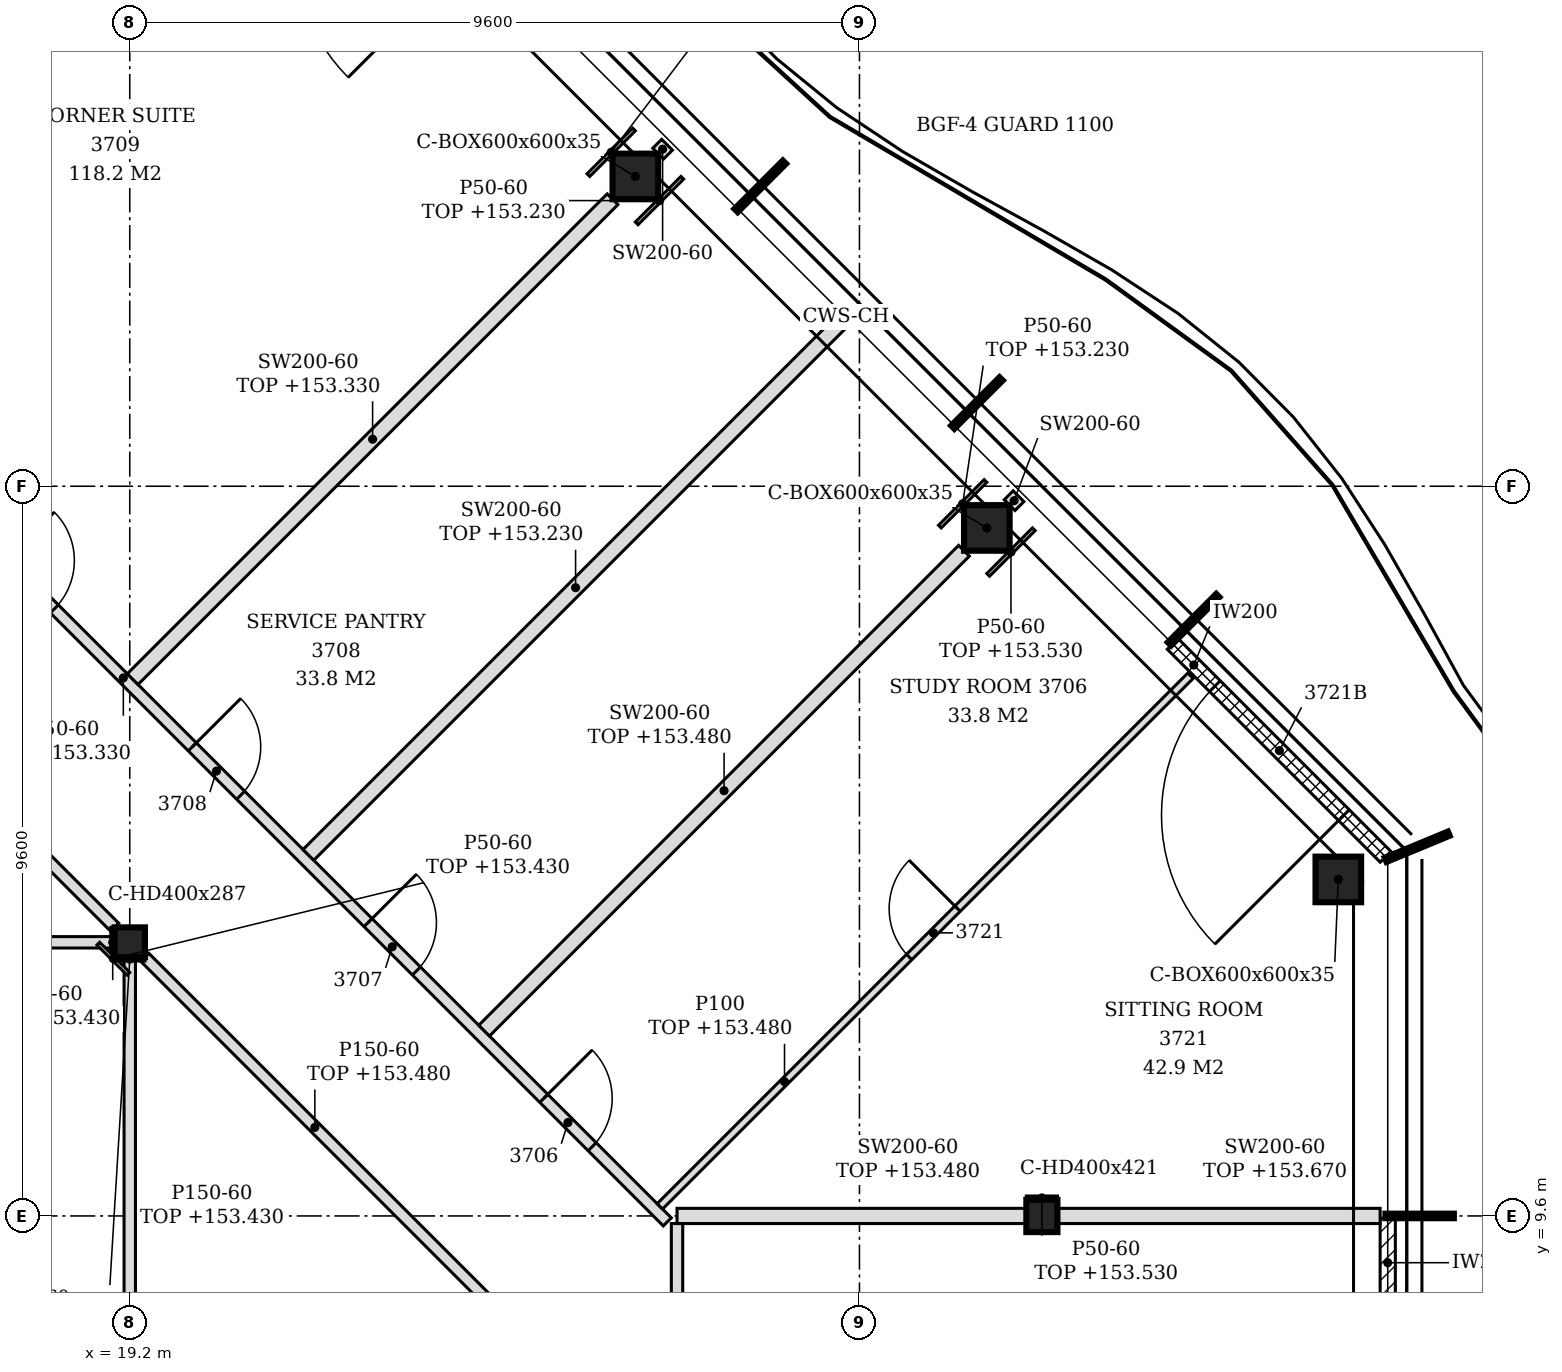
"""IFC4 building model, lengths in metres.
Left out: names, types, materials, properties, quantities, classifications, styles, units other than length and angle.
Written with IfcOpenShell. Run it as: python <this file> out.ifc"""

import sys

from ifc_helpers import new_model, si_unit, direction, frame, frame_2d, origin, origin_2d, place, context, subcontext, project, spatial, polyline, rectangle, hollow_rectangle, i_section, outline, extrude, element, fill, save


model = new_model("IFC4")
c1 = context("Model", 3, precision=1e-05, world=origin(), true_north=direction((0.0, 1.0)))
c2 = subcontext(c1, "Body", "Model", "MODEL_VIEW")
j1 = project(units=[si_unit("LENGTHUNIT", "METRE"), si_unit("PLANEANGLEUNIT", "RADIAN")], contexts=[c1])
p1 = place(None, origin())
s1 = spatial("IfcSite", under=j1, at=p1, CompositionType="ELEMENT")
p2 = place(p1, origin())
s2 = spatial("IfcBuilding", under=s1, at=p2, CompositionType="ELEMENT")
p3 = place(p2, frame((0.0, 0.0, 150.6)))
s3 = spatial("IfcBuildingStorey", under=s2, at=p3, CompositionType="ELEMENT", Elevation=150.6)
for number, where, z_axis, x_axis in (
    (1, (35.1, 14.027, -0.15), (0.0, 0.0, 1.0), (1.0, 0.0, 0.0)),
    (2, (30.476, 18.652, -0.15), (0.0, 0.0, 1.0), (1.0, 0.0, 0.0)),
    (3, (25.852, 23.276, -0.15), (0.0, 0.0, 1.0), (1.0, 0.0, 0.0)),
):
    element("IfcColumn", number, at=place(p3, frame(where, z_axis=z_axis, x_axis=x_axis)), inside=s3, PredefinedType="COLUMN", context=c2, shape_type="SweptSolid", body=[
        extrude(hollow_rectangle(XDim=0.6, YDim=0.6, WallThickness=0.035, at=origin_2d()), origin(), (0.0, 0.0, 1.0), 3.6),
    ])
p4 = place(p3, frame((19.2, 13.2, -0.15), z_axis=(0.0, 0.0, 1.0), x_axis=(1.0, 0.0, 0.0)))
e4 = element("IfcColumn", 4, at=p4, inside=s3, PredefinedType="COLUMN", context=c2, shape_type="SweptSolid", body=[
    extrude(i_section(OverallWidth=0.399, OverallDepth=0.393, WebThickness=0.023, FlangeThickness=0.037, FilletRadius=0.015, at=origin_2d()), origin(), (0.0, 0.0, 1.0), 3.6),
])
p5 = place(p3, frame((31.2, 9.6, -0.15), z_axis=(0.0, 0.0, 1.0), x_axis=(1.0, 0.0, 0.0)))
e5 = element("IfcColumn", 5, at=p5, inside=s3, PredefinedType="COLUMN", context=c2, shape_type="SweptSolid", body=[
    extrude(i_section(OverallWidth=0.409, OverallDepth=0.425, WebThickness=0.033, FlangeThickness=0.052, FilletRadius=0.015, at=origin_2d()), origin(), (0.0, 0.0, 1.0), 3.6),
])
p6 = place(p3, frame((35.75, 4.83, 0.0), z_axis=(0.0, 0.0, 1.0), x_axis=(0.0, 1.0, 0.0)))
e6 = element("IfcWall", 6, at=p6, inside=s3, PredefinedType="NOTDEFINED", context=c2, shape_type="SweptSolid", body=[
    extrude(rectangle(XDim=4.74, YDim=0.2, at=frame_2d((2.37, 0.0))), origin(), (0.0, 0.0, 1.0), 3.45),
])
p7 = place(p6, frame((1.17, 0.0, 0.0)))
e7 = element("IfcOpeningElement", 7, at=p7, cuts=e6, PredefinedType="OPENING", context=c2, shape_type="SweptSolid", body=[
    extrude(rectangle(XDim=2.4, YDim=2.4, at=frame_2d((1.2, 1.2))), frame((0.0, 0.11, 0.0), z_axis=(0.0, -1.0, 0.0), x_axis=(1.0, 0.0, 0.0)), (0.0, 0.0, 1.0), 0.22),
])
p8 = place(p3, frame((35.722, 14.325, 0.0), z_axis=(0.0, 0.0, 1.0), x_axis=(-0.707106781187, 0.707106781187, 0.0)))
e8 = element("IfcWall", 8, at=p8, inside=s3, PredefinedType="NOTDEFINED", context=c2, shape_type="SweptSolid", body=[
    extrude(rectangle(XDim=3.962, YDim=0.2, at=frame_2d((1.981, 0.0))), origin(), (0.0, 0.0, 1.0), 3.45),
])
p9 = place(p8, frame((0.775, 0.0, 0.0)))
e9 = element("IfcOpeningElement", 9, at=p9, cuts=e8, PredefinedType="OPENING", context=c2, shape_type="SweptSolid", body=[
    extrude(rectangle(XDim=2.4, YDim=2.4, at=frame_2d((1.2, 1.2))), frame((0.0, 0.11, 0.0), z_axis=(0.0, -1.0, 0.0), x_axis=(1.0, 0.0, 0.0)), (0.0, 0.0, 1.0), 0.22),
])
p10 = place(p3, frame((26.4, -4.448, 0.0), z_axis=(0.0, 0.0, 1.0), x_axis=(0.0, 1.0, 0.0)))
e10 = element("IfcWall", 10, at=p10, inside=s3, PredefinedType="PARTITIONING", context=c2, shape_type="SweptSolid", body=[
    extrude(outline(polyline([(0.0, 0.0), (13.948, 0.0), (13.948, 2.88), (13.943, 2.88), (13.941, 3.45), (9.353, 3.45), (9.351, 2.88), (9.143, 2.88), (9.141, 3.45), (4.553, 3.45), (4.551, 2.88), (4.343, 2.88), (4.341, 3.45), (0.0, 3.45), (0.0, 0.0)])), frame((0.0, 0.075, 0.0), z_axis=(0.0, -1.0, 0.0), x_axis=(1.0, 0.0, 0.0)), (0.0, 0.0, 1.0), 0.15),
])
p11 = place(p10, frame((1.701, 0.0, 0.0)))
e11 = element("IfcOpeningElement", 11, at=p11, cuts=e10, PredefinedType="OPENING", context=c2, shape_type="SweptSolid", body=[
    extrude(rectangle(XDim=0.9, YDim=2.1, at=frame_2d((0.45, 1.05))), frame((0.0, 0.085, 0.0), z_axis=(0.0, -1.0, 0.0), x_axis=(1.0, 0.0, 0.0)), (0.0, 0.0, 1.0), 0.17),
])
p12 = place(p10, frame((5.198, 0.0, 0.0)))
e12 = element("IfcOpeningElement", 12, at=p12, cuts=e10, PredefinedType="OPENING", context=c2, shape_type="SweptSolid", body=[
    extrude(rectangle(XDim=0.9, YDim=2.1, at=frame_2d((0.45, 1.05))), frame((0.0, 0.085, 0.0), z_axis=(0.0, -1.0, 0.0), x_axis=(1.0, 0.0, 0.0)), (0.0, 0.0, 1.0), 0.17),
])
p13 = place(p10, frame((11.095, 0.0, 0.0)))
e13 = element("IfcOpeningElement", 13, at=p13, cuts=e10, PredefinedType="OPENING", context=c2, shape_type="SweptSolid", body=[
    extrude(rectangle(XDim=0.9, YDim=2.1, at=frame_2d((0.45, 1.05))), frame((0.0, 0.085, 0.0), z_axis=(0.0, -1.0, 0.0), x_axis=(1.0, 0.0, 0.0)), (0.0, 0.0, 1.0), 0.17),
])
p14 = place(p3, frame((19.2, 2.596, 0.0), z_axis=(0.0, 0.0, 1.0), x_axis=(0.0, 1.0, 0.0)))
e14 = element("IfcWall", 14, at=p14, inside=s3, PredefinedType="PARTITIONING", context=c2, shape_type="SweptSolid", body=[
    extrude(rectangle(XDim=10.407, YDim=0.15, at=frame_2d((5.204, 0.0))), origin(), (0.0, 0.0, 1.0), 2.83),
])
p15 = place(p14, frame((2.954, 0.0, 0.0)))
e15 = element("IfcOpeningElement", 15, at=p15, cuts=e14, PredefinedType="OPENING", context=c2, shape_type="SweptSolid", body=[
    extrude(rectangle(XDim=0.9, YDim=2.1, at=frame_2d((0.45, 1.05))), frame((0.0, 0.085, 0.0), z_axis=(0.0, -1.0, 0.0), x_axis=(1.0, 0.0, 0.0)), (0.0, 0.0, 1.0), 0.17),
])
p16 = place(p3, frame((23.872, 8.528, 0.0), z_axis=(0.0, 0.0, 1.0), x_axis=(-0.707126073897, 0.70708748795, 0.0)))
e16 = element("IfcWall", 16, at=p16, inside=s3, PredefinedType="PARTITIONING", context=c2, shape_type="SweptSolid", body=[
    extrude(rectangle(XDim=6.327, YDim=0.15, at=frame_2d((3.164, 0.0))), origin(), (0.0, 0.0, 1.0), 2.88),
])
p17 = place(p3, frame((26.272, 9.522, 0.0), z_axis=(0.0, 0.0, 1.0), x_axis=(-0.707097742657, 0.707115819601, 0.0)))
e17 = element("IfcWall", 17, at=p17, inside=s3, PredefinedType="PARTITIONING", context=c2, shape_type="SweptSolid", body=[
    extrude(rectangle(XDim=13.506, YDim=0.15, at=frame_2d((6.753, 0.0))), origin(), (0.0, 0.0, 1.0), 2.73),
])
p18 = place(p17, frame((1.398, 0.0, 0.0)))
e18 = element("IfcOpeningElement", 18, at=p18, cuts=e17, PredefinedType="OPENING", context=c2, shape_type="SweptSolid", body=[
    extrude(rectangle(XDim=0.9, YDim=2.1, at=frame_2d((0.45, 1.05))), frame((0.0, 0.085, 0.0), z_axis=(0.0, -1.0, 0.0), x_axis=(1.0, 0.0, 0.0)), (0.0, 0.0, 1.0), 0.17),
])
p19 = place(p17, frame((4.668, 0.0, 0.0)))
e19 = element("IfcOpeningElement", 19, at=p19, cuts=e17, PredefinedType="OPENING", context=c2, shape_type="SweptSolid", body=[
    extrude(rectangle(XDim=0.9, YDim=2.1, at=frame_2d((0.45, 1.05))), frame((0.0, 0.085, 0.0), z_axis=(0.0, -1.0, 0.0), x_axis=(1.0, 0.0, 0.0)), (0.0, 0.0, 1.0), 0.17),
])
p20 = place(p17, frame((7.938, 0.0, 0.0)))
e20 = element("IfcOpeningElement", 20, at=p20, cuts=e17, PredefinedType="OPENING", context=c2, shape_type="SweptSolid", body=[
    extrude(rectangle(XDim=0.9, YDim=2.1, at=frame_2d((0.45, 1.05))), frame((0.0, 0.085, 0.0), z_axis=(0.0, -1.0, 0.0), x_axis=(1.0, 0.0, 0.0)), (0.0, 0.0, 1.0), 0.17),
])
p21 = place(p17, frame((11.405, 0.0, 0.0)))
e21 = element("IfcOpeningElement", 21, at=p21, cuts=e17, PredefinedType="OPENING", context=c2, shape_type="SweptSolid", body=[
    extrude(rectangle(XDim=0.9, YDim=2.1, at=frame_2d((0.45, 1.05))), frame((0.0, 0.085, 0.0), z_axis=(0.0, -1.0, 0.0), x_axis=(1.0, 0.0, 0.0)), (0.0, 0.0, 1.0), 0.17),
])
p22 = place(p3, frame((26.4, 9.6, 0.0), z_axis=(0.0, 0.0, 1.0), x_axis=(1.0, 0.0, 0.0)))
e22 = element("IfcWall", 22, at=p22, inside=s3, PredefinedType="PARTITIONING", context=c2, shape_type="SweptSolid", body=[
    extrude(rectangle(XDim=4.595, YDim=0.2, at=frame_2d((2.298, 0.0))), origin(), (0.0, 0.0, 1.0), 2.88),
])
p23 = place(p3, frame((31.405, 9.6, 0.0), z_axis=(0.0, 0.0, 1.0), x_axis=(1.0, 0.0, 0.0)))
e23 = element("IfcWall", 23, at=p23, inside=s3, PredefinedType="PARTITIONING", context=c2, shape_type="SweptSolid", body=[
    extrude(outline(polyline([(0.0, 0.0), (4.245, 0.0), (4.246, 3.07), (3.845, 3.07), (3.844, 2.93), (3.545, 2.93), (3.543, 3.07), (0.0, 3.07), (0.0, 0.0)])), frame((0.0, 0.1, 0.0), z_axis=(0.0, -1.0, 0.0), x_axis=(1.0, 0.0, 0.0)), (0.0, 0.0, 1.0), 0.2),
])
p24 = place(p3, frame((26.174, 9.726, 0.0), z_axis=(0.0, 0.0, 1.0), x_axis=(0.707106781187, 0.707106781187, 0.0)))
e24 = element("IfcWall", 24, at=p24, inside=s3, PredefinedType="PARTITIONING", context=c2, shape_type="SweptSolid", body=[
    extrude(rectangle(XDim=9.873, YDim=0.1, at=frame_2d((4.937, 0.0))), origin(), (0.0, 0.0, 1.0), 2.88),
])
p25 = place(p24, frame((4.639, 0.0, 0.0)))
e25 = element("IfcOpeningElement", 25, at=p25, cuts=e24, PredefinedType="OPENING", context=c2, shape_type="SweptSolid", body=[
    extrude(rectangle(XDim=0.9, YDim=2.1, at=frame_2d((0.45, 1.05))), frame((0.0, 0.06, 0.0), z_axis=(0.0, -1.0, 0.0), x_axis=(1.0, 0.0, 0.0)), (0.0, 0.0, 1.0), 0.12),
])
p26 = place(p3, frame((23.862, 12.038, 0.0), z_axis=(0.0, 0.0, 1.0), x_axis=(0.707106781187, 0.707106781187, 0.0)))
e26 = element("IfcWall", 26, at=p26, inside=s3, PredefinedType="PARTITIONING", context=c2, shape_type="SweptSolid", body=[
    extrude(rectangle(XDim=8.929, YDim=0.2, at=frame_2d((4.464, 0.0))), origin(), (0.0, 0.0, 1.0), 2.88),
])
p27 = place(p3, frame((7.399, 13.2, 0.0), z_axis=(0.0, 0.0, 1.0), x_axis=(1.0, 0.0, 0.0)))
e27 = element("IfcWall", 27, at=p27, inside=s3, PredefinedType="PARTITIONING", context=c2, shape_type="SweptSolid", body=[
    extrude(rectangle(XDim=11.601, YDim=0.15, at=frame_2d((5.801, 0.0))), origin(), (0.0, 0.0, 1.0), 2.83),
])
p28 = place(p27, frame((2.051, 0.0, 0.0)))
e28 = element("IfcOpeningElement", 28, at=p28, cuts=e27, PredefinedType="OPENING", context=c2, shape_type="SweptSolid", body=[
    extrude(rectangle(XDim=0.9, YDim=2.1, at=frame_2d((0.45, 1.05))), frame((0.0, 0.085, 0.0), z_axis=(0.0, -1.0, 0.0), x_axis=(1.0, 0.0, 0.0)), (0.0, 0.0, 1.0), 0.17),
])
p29 = place(p3, frame((19.002, 13.398, 0.0), z_axis=(0.0, 0.0, 1.0), x_axis=(-0.707080416772, 0.707133144618, 0.0)))
e29 = element("IfcWall", 29, at=p29, inside=s3, PredefinedType="PARTITIONING", context=c2, shape_type="SweptSolid", body=[
    extrude(rectangle(XDim=4.63, YDim=0.15, at=frame_2d((2.315, 0.0))), origin(), (0.0, 0.0, 1.0), 3.45),
])
p30 = place(p3, frame((21.55, 14.35, 0.0), z_axis=(0.0, 0.0, 1.0), x_axis=(0.707106781187, 0.707106781187, 0.0)))
e30 = element("IfcWall", 30, at=p30, inside=s3, PredefinedType="PARTITIONING", context=c2, shape_type="SweptSolid", body=[
    extrude(rectangle(XDim=9.943, YDim=0.2, at=frame_2d((4.972, 0.0))), origin(), (0.0, 0.0, 1.0), 2.63),
])
p31 = place(p3, frame((19.238, 16.662, 0.0), z_axis=(0.0, 0.0, 1.0), x_axis=(0.707106781187, 0.707106781187, 0.0)))
e31 = element("IfcWall", 31, at=p31, inside=s3, PredefinedType="PARTITIONING", context=c2, shape_type="SweptSolid", body=[
    extrude(rectangle(XDim=8.929, YDim=0.2, at=frame_2d((4.464, 0.0))), origin(), (0.0, 0.0, 1.0), 2.73),
])
for number, where, z_axis, x_axis in (
    (32, (30.776, 18.952, 0.0), (0.0, 0.0, 1.0), (0.707, 0.707, 0.0)),
    (33, (26.152, 23.576, 0.0), (0.0, 0.0, 1.0), (0.707, 0.707, 0.0)),
):
    element("IfcWall", number, at=place(p3, frame(where, z_axis=z_axis, x_axis=x_axis)), inside=s3, PredefinedType="PARTITIONING", context=c2, shape_type="SweptSolid", body=[
        extrude(rectangle(XDim=0.166, YDim=0.2, at=frame_2d((0.083, 0.0))), origin(), (0.0, 0.0, 1.0), 3.45),
    ])
p32 = place(p3, frame((18.976, 13.003, 0.0), z_axis=(0.0, 0.0, 1.0), x_axis=(0.0, 1.0, 0.0)))
e34 = element("IfcWall", 34, at=p32, inside=s3, PredefinedType="PARTITIONING", context=c2, shape_type="SweptSolid", body=[
    extrude(rectangle(XDim=0.393, YDim=0.05, at=frame_2d((0.197, 0.0))), origin(), (0.0, 0.0, 1.0), 2.83),
])
p33 = place(p3, frame((19.182, 12.786, 0.0), z_axis=(0.0, 0.0, 1.0), x_axis=(-0.707106781187, 0.707106781187, 0.0)))
e35 = element("IfcWall", 35, at=p33, inside=s3, PredefinedType="PARTITIONING", context=c2, shape_type="SweptSolid", body=[
    extrude(rectangle(XDim=0.56, YDim=0.05, at=frame_2d((0.28, 0.0))), origin(), (0.0, 0.0, 1.0), 2.83),
])
p34 = place(p3, frame((30.996, 9.837, 0.0), z_axis=(0.0, 0.0, 1.0), x_axis=(1.0, 0.0, 0.0)))
e36 = element("IfcWall", 36, at=p34, inside=s3, PredefinedType="PARTITIONING", context=c2, shape_type="SweptSolid", body=[
    extrude(rectangle(XDim=0.409, YDim=0.05, at=frame_2d((0.205, 0.0))), origin(), (0.0, 0.0, 1.0), 2.93),
])
p35 = place(p3, frame((29.858, 18.669, 0.0), z_axis=(0.0, 0.0, 1.0), x_axis=(0.707106781187, 0.707106781187, 0.0)))
e37 = element("IfcWall", 37, at=p35, inside=s3, PredefinedType="PARTITIONING", context=c2, shape_type="SweptSolid", body=[
    extrude(rectangle(XDim=0.849, YDim=0.05, at=frame_2d((0.424, 0.0))), origin(), (0.0, 0.0, 1.0), 2.63),
])
p36 = place(p3, frame((30.493, 18.034, 0.0), z_axis=(0.0, 0.0, 1.0), x_axis=(0.707106781187, 0.707106781187, 0.0)))
e38 = element("IfcWall", 38, at=p36, inside=s3, PredefinedType="PARTITIONING", context=c2, shape_type="SweptSolid", body=[
    extrude(rectangle(XDim=0.849, YDim=0.05, at=frame_2d((0.424, 0.0))), origin(), (0.0, 0.0, 1.0), 2.93),
])
p37 = place(p3, frame((19.0, 12.979, 0.0), z_axis=(0.0, 0.0, 1.0), x_axis=(1.0, 0.0, 0.0)))
e39 = element("IfcWall", 39, at=p37, inside=s3, PredefinedType="PARTITIONING", context=c2, shape_type="SweptSolid", body=[
    extrude(rectangle(XDim=0.399, YDim=0.05, at=frame_2d((0.199, 0.0))), origin(), (0.0, 0.0, 1.0), 2.83),
])
p38 = place(p3, frame((25.234, 23.293, 0.0), z_axis=(0.0, 0.0, 1.0), x_axis=(0.707106781187, 0.707106781187, 0.0)))
e40 = element("IfcWall", 40, at=p38, inside=s3, PredefinedType="PARTITIONING", context=c2, shape_type="SweptSolid", body=[
    extrude(rectangle(XDim=0.848, YDim=0.05, at=frame_2d((0.424, 0.0))), origin(), (0.0, 0.0, 1.0), 2.93),
])
p39 = place(p3, frame((25.869, 22.658, 0.0), z_axis=(0.0, 0.0, 1.0), x_axis=(0.707106781187, 0.707106781187, 0.0)))
e41 = element("IfcWall", 41, at=p39, inside=s3, PredefinedType="PARTITIONING", context=c2, shape_type="SweptSolid", body=[
    extrude(rectangle(XDim=0.849, YDim=0.05, at=frame_2d((0.424, 0.0))), origin(), (0.0, 0.0, 1.0), 2.63),
])
p40 = place(p9, origin())
e42 = element("IfcDoor", 42, at=p40, inside=s3, OperationType="SINGLE_SWING_LEFT", PredefinedType="DOOR", context=c2, shape_type="SweptSolid", body=[
    extrude(rectangle(XDim=2.4, YDim=2.4, at=frame_2d((1.2, 1.2))), frame((0.0, 0.025, 0.0), z_axis=(0.0, -1.0, 0.0), x_axis=(1.0, 0.0, 0.0)), (0.0, 0.0, 1.0), 0.05),
])
fill(e9, e42)
p41 = place(p18, frame((0.9, 0.0, 0.0), z_axis=(0.0, 0.0, 1.0), x_axis=(-1.0, 0.0, 0.0)))
e43 = element("IfcDoor", 43, at=p41, inside=s3, OperationType="SINGLE_SWING_LEFT", PredefinedType="DOOR", context=c2, shape_type="SweptSolid", body=[
    extrude(rectangle(XDim=0.9, YDim=2.1, at=frame_2d((0.45, 1.05))), frame((0.0, 0.025, 0.0), z_axis=(0.0, -1.0, 0.0), x_axis=(1.0, 0.0, 0.0)), (0.0, 0.0, 1.0), 0.05),
])
fill(e18, e43)
p42 = place(p19, frame((0.9, 0.0, 0.0), z_axis=(0.0, 0.0, 1.0), x_axis=(-1.0, 0.0, 0.0)))
e44 = element("IfcDoor", 44, at=p42, inside=s3, OperationType="SINGLE_SWING_LEFT", PredefinedType="DOOR", context=c2, shape_type="SweptSolid", body=[
    extrude(rectangle(XDim=0.9, YDim=2.1, at=frame_2d((0.45, 1.05))), frame((0.0, 0.025, 0.0), z_axis=(0.0, -1.0, 0.0), x_axis=(1.0, 0.0, 0.0)), (0.0, 0.0, 1.0), 0.05),
])
fill(e19, e44)
p43 = place(p20, frame((0.9, 0.0, 0.0), z_axis=(0.0, 0.0, 1.0), x_axis=(-1.0, 0.0, 0.0)))
e45 = element("IfcDoor", 45, at=p43, inside=s3, OperationType="SINGLE_SWING_LEFT", PredefinedType="DOOR", context=c2, shape_type="SweptSolid", body=[
    extrude(rectangle(XDim=0.9, YDim=2.1, at=frame_2d((0.45, 1.05))), frame((0.0, 0.025, 0.0), z_axis=(0.0, -1.0, 0.0), x_axis=(1.0, 0.0, 0.0)), (0.0, 0.0, 1.0), 0.05),
])
fill(e20, e45)
p44 = place(p21, frame((0.9, 0.0, 0.0), z_axis=(0.0, 0.0, 1.0), x_axis=(-1.0, 0.0, 0.0)))
e46 = element("IfcDoor", 46, at=p44, inside=s3, OperationType="SINGLE_SWING_LEFT", PredefinedType="DOOR", context=c2, shape_type="SweptSolid", body=[
    extrude(rectangle(XDim=0.9, YDim=2.1, at=frame_2d((0.45, 1.05))), frame((0.0, 0.025, 0.0), z_axis=(0.0, -1.0, 0.0), x_axis=(1.0, 0.0, 0.0)), (0.0, 0.0, 1.0), 0.05),
])
fill(e21, e46)
p45 = place(p25, origin())
e47 = element("IfcDoor", 47, at=p45, inside=s3, OperationType="SINGLE_SWING_RIGHT", PredefinedType="DOOR", context=c2, shape_type="SweptSolid", body=[
    extrude(rectangle(XDim=0.9, YDim=2.1, at=frame_2d((0.45, 1.05))), frame((0.0, 0.025, 0.0), z_axis=(0.0, -1.0, 0.0), x_axis=(1.0, 0.0, 0.0)), (0.0, 0.0, 1.0), 0.05),
])
fill(e25, e47)
save(model, sys.argv[1])
